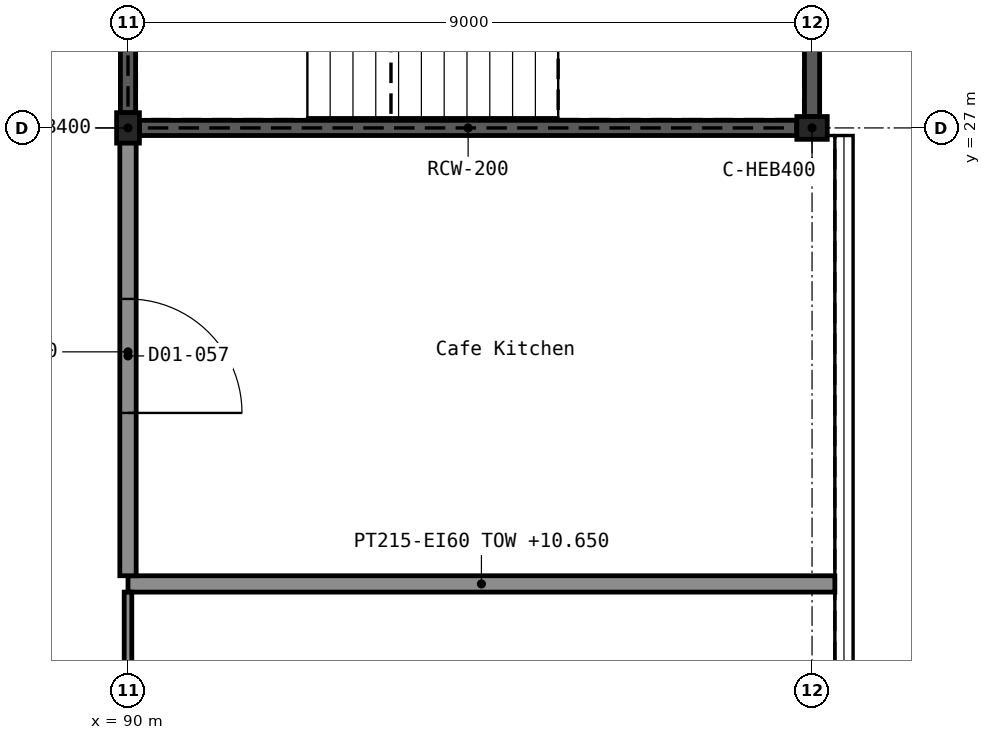
"""IFC4 building model, lengths in metres.
Left out: names, types, materials, properties, quantities, classifications, styles, units other than length and angle.
Written with IfcOpenShell. Run it as: python <this file> out.ifc"""

import sys

from ifc_helpers import new_model, si_unit, direction, frame, frame_2d, origin, origin_2d, place, context, subcontext, project, spatial, rectangle, i_section, extrude, element, fill, save


model = new_model("IFC4")
c1 = context("Model", 3, precision=1e-05, world=origin(), true_north=direction((0.0, 1.0)))
c2 = subcontext(c1, "Body", "Model", "MODEL_VIEW")
j1 = project(units=[si_unit("LENGTHUNIT", "METRE"), si_unit("PLANEANGLEUNIT", "RADIAN")], contexts=[c1])
p1 = place(None, origin())
s1 = spatial("IfcSite", under=j1, at=p1, CompositionType="ELEMENT")
p2 = place(p1, origin())
s2 = spatial("IfcBuilding", under=s1, at=p2, CompositionType="ELEMENT")
p3 = place(p2, frame((0.0, 0.0, 5.4)))
s3 = spatial("IfcBuildingStorey", under=s2, at=p3, CompositionType="ELEMENT", Elevation=5.4)
for number, where, z_axis, x_axis in (
    (1, (90.0, 27.0, 0.0), (0.0, 0.0, 1.0), (1.0, 0.0, 0.0)),
    (2, (99.0, 27.0, 0.0), (0.0, 0.0, 1.0), (0.0, 1.0, 0.0)),
):
    element("IfcColumn", number, at=place(p3, frame(where, z_axis=z_axis, x_axis=x_axis)), inside=s3, PredefinedType="COLUMN", context=c2, shape_type="SweptSolid", body=[
        extrude(i_section(OverallWidth=0.3, OverallDepth=0.4, WebThickness=0.013, FlangeThickness=0.024, FilletRadius=0.027, at=origin_2d()), origin(), (0.0, 0.0, 1.0), 5.4),
    ])
p4 = place(p3, frame((90.15, 27.0, 0.0), z_axis=(0.0, 0.0, 1.0), x_axis=(1.0, 0.0, 0.0)))
e3 = element("IfcWall", 3, at=p4, inside=s3, PredefinedType="SHEAR", context=c2, shape_type="SweptSolid", body=[
    extrude(rectangle(XDim=8.65, YDim=0.2, at=frame_2d((4.325, 0.0))), origin(), (0.0, 0.0, 1.0), 5.4),
])
p5 = place(p3, frame((90.0, 27.2, 0.0), z_axis=(0.0, 0.0, 1.0), x_axis=(0.0, 1.0, 0.0)))
e4 = element("IfcWall", 4, at=p5, inside=s3, PredefinedType="SHEAR", context=c2, shape_type="SweptSolid", body=[
    extrude(rectangle(XDim=8.6, YDim=0.2, at=frame_2d((4.3, 0.0))), origin(), (0.0, 0.0, 1.0), 5.4),
])
p6 = place(p5, frame((3.7, 0.0, 0.0)))
e5 = element("IfcOpeningElement", 5, at=p6, cuts=e4, PredefinedType="OPENING", context=c2, shape_type="SweptSolid", body=[
    extrude(rectangle(XDim=1.2, YDim=2.1, at=frame_2d((0.6, 1.05))), frame((0.0, 0.111, 0.0), z_axis=(0.0, -1.0, 0.0), x_axis=(1.0, 0.0, 0.0)), (0.0, 0.0, 1.0), 0.222),
])
p7 = place(p3, frame((99.0, 27.15, -0.15), z_axis=(0.0, 0.0, 1.0), x_axis=(0.0, 1.0, 0.0)))
e6 = element("IfcWall", 6, at=p7, inside=s3, PredefinedType="SHEAR", context=c2, shape_type="SweptSolid", body=[
    extrude(rectangle(XDim=8.7, YDim=0.2, at=frame_2d((4.35, 0.0))), origin(), (0.0, 0.0, 1.0), 5.55),
])
p8 = place(p3, frame((90.0, 21.0, 0.0), z_axis=(0.0, 0.0, 1.0), x_axis=(1.0, 0.0, 0.0)))
e7 = element("IfcWall", 7, at=p8, inside=s3, PredefinedType="PARTITIONING", context=c2, shape_type="SweptSolid", body=[
    extrude(rectangle(XDim=9.3, YDim=0.215, at=frame_2d((4.65, 0.0))), origin(), (0.0, 0.0, 1.0), 5.25),
])
p9 = place(p3, frame((90.0, 21.107, 0.0), z_axis=(0.0, 0.0, 1.0), x_axis=(0.0, 1.0, 0.0)))
e8 = element("IfcWall", 8, at=p9, inside=s3, PredefinedType="PARTITIONING", context=c2, shape_type="SweptSolid", body=[
    extrude(rectangle(XDim=5.893, YDim=0.215, at=frame_2d((2.946, 0.0))), origin(), (0.0, 0.0, 1.0), 4.8),
])
p10 = place(p9, frame((2.143, 0.0, 0.0)))
e9 = element("IfcOpeningElement", 9, at=p10, cuts=e8, PredefinedType="OPENING", context=c2, shape_type="SweptSolid", body=[
    extrude(rectangle(XDim=1.5, YDim=2.1, at=frame_2d((0.75, 1.05))), frame((0.0, 0.119, 0.0), z_axis=(0.0, -1.0, 0.0), x_axis=(1.0, 0.0, 0.0)), (0.0, 0.0, 1.0), 0.237),
])
p11 = place(p3, frame((90.0, 9.0, 0.0), z_axis=(0.0, 0.0, 1.0), x_axis=(0.0, 1.0, 0.0)))
e10 = element("IfcWall", 10, at=p11, inside=s3, PredefinedType="PARTITIONING", context=c2, shape_type="SweptSolid", body=[
    extrude(rectangle(XDim=11.893, YDim=0.1, at=frame_2d((5.946, 0.0))), origin(), (0.0, 0.0, 1.0), 4.8),
])
p12 = place(p11, frame((5.0, 0.0, 0.0)))
e11 = element("IfcOpeningElement", 11, at=p12, cuts=e10, PredefinedType="OPENING", context=c2, shape_type="SweptSolid", body=[
    extrude(rectangle(XDim=2.0, YDim=2.1, at=frame_2d((1.0, 1.05))), frame((0.0, 0.061, 0.0), z_axis=(0.0, -1.0, 0.0), x_axis=(1.0, 0.0, 0.0)), (0.0, 0.0, 1.0), 0.122),
])
p13 = place(p10, frame((1.5, 0.0, 0.0), z_axis=(0.0, 0.0, 1.0), x_axis=(-1.0, 0.0, 0.0)))
e12 = element("IfcDoor", 12, at=p13, inside=s3, OperationType="DOUBLE_DOOR_SINGLE_SWING", PredefinedType="DOOR", context=c2, shape_type="SweptSolid", body=[
    extrude(rectangle(XDim=1.5, YDim=2.1, at=frame_2d((0.75, 1.05))), frame((0.0, 0.025, 0.0), z_axis=(0.0, -1.0, 0.0), x_axis=(1.0, 0.0, 0.0)), (0.0, 0.0, 1.0), 0.05),
])
fill(e9, e12)
save(model, sys.argv[1])
